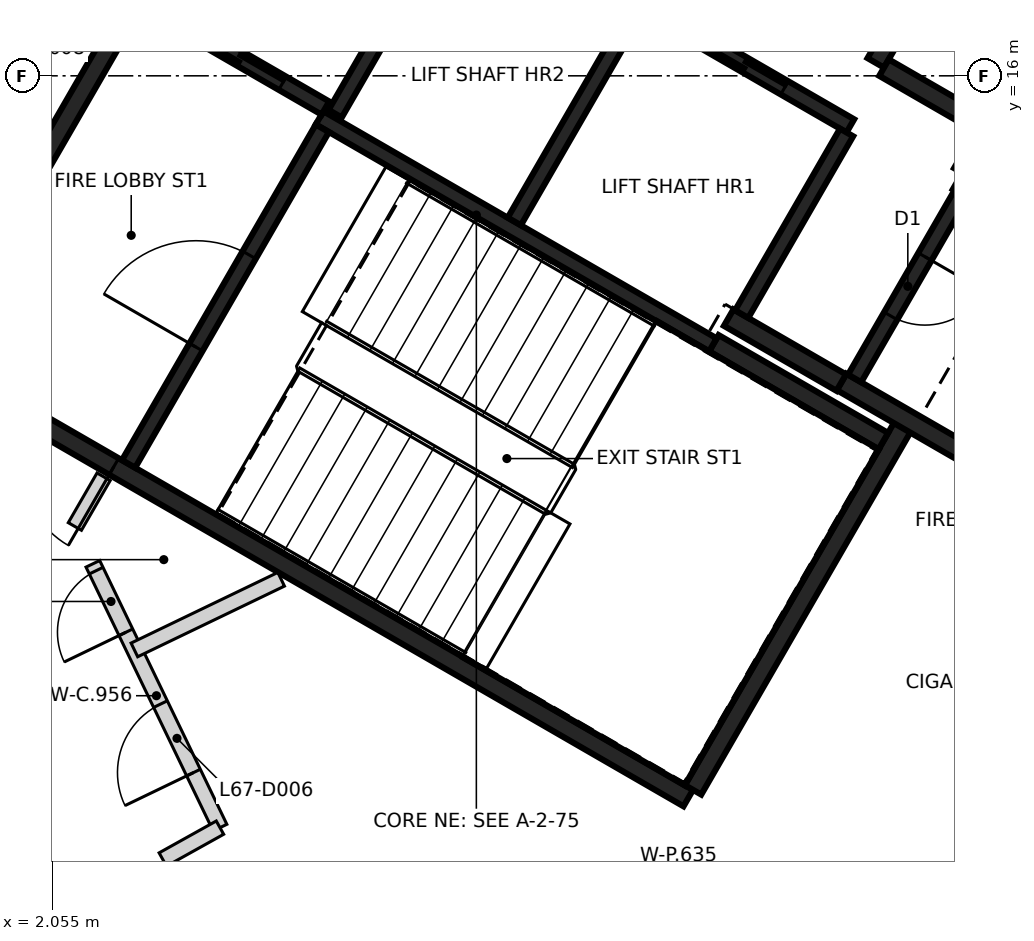
"""IFC4 building model, lengths in metres.
Left out: names, types, materials, properties, quantities, classifications, styles, units other than length and angle.
Written with IfcOpenShell. Run it as: python <this file> out.ifc"""

import sys

from ifc_helpers import new_model, si_unit, direction, frame, frame_2d, origin, place, context, subcontext, project, spatial, rectangle, extrude, element, fill, save


model = new_model("IFC4")
c1 = context("Model", 3, precision=1e-05, world=origin(), true_north=direction((0.0, 1.0)))
c2 = subcontext(c1, "Body", "Model", "MODEL_VIEW")
j1 = project(units=[si_unit("LENGTHUNIT", "METRE"), si_unit("PLANEANGLEUNIT", "RADIAN")], contexts=[c1])
p1 = place(None, origin())
s1 = spatial("IfcSite", under=j1, at=p1, CompositionType="ELEMENT")
p2 = place(p1, origin())
s2 = spatial("IfcBuilding", under=s1, at=p2, CompositionType="ELEMENT")
p3 = place(p2, frame((0.0, 0.0, 265.8)))
s3 = spatial("IfcBuildingStorey", under=s2, at=p3, CompositionType="ELEMENT", Elevation=265.8)
p4 = place(p3, frame((10.42, 6.498, 0.0), z_axis=(0.0, 0.0, 1.0), x_axis=(-0.866021906294, 0.500006057782, 0.0)))
e1 = element("IfcWall", 1, at=p4, inside=s3, PredefinedType="SHEAR", context=c2, shape_type="SweptSolid", body=[
    extrude(rectangle(XDim=11.55, YDim=0.25, at=frame_2d((5.775, 0.0))), origin(), (0.0, 0.0, 1.0), 3.25),
])
p5 = place(p4, frame((10.025, 0.0, 0.0)))
e2 = element("IfcOpeningElement", 2, at=p5, cuts=e1, PredefinedType="OPENING", context=c2, shape_type="SweptSolid", body=[
    extrude(rectangle(XDim=1.2, YDim=2.1, at=frame_2d((0.6, 1.05))), frame((0.0, 0.135, 0.0), z_axis=(0.0, -1.0, 0.0), x_axis=(1.0, 0.0, 0.0)), (0.0, 0.0, 1.0), 0.27),
])
p6 = place(p4, frame((8.725, 0.0, 0.0)))
e3 = element("IfcOpeningElement", 3, at=p6, cuts=e1, PredefinedType="OPENING", context=c2, shape_type="SweptSolid", body=[
    extrude(rectangle(XDim=1.2, YDim=2.1, at=frame_2d((0.6, 1.05))), frame((0.0, 0.135, 0.0), z_axis=(0.0, -1.0, 0.0), x_axis=(1.0, 0.0, 0.0)), (0.0, 0.0, 1.0), 0.27),
])
p7 = place(p3, frame((0.48, 12.381, 0.0), z_axis=(0.0, 0.0, 1.0), x_axis=(0.49999885962, 0.866026062182, 0.0)))
e4 = element("IfcWall", 4, at=p7, inside=s3, PredefinedType="SHEAR", context=c2, shape_type="SweptSolid", body=[
    extrude(rectangle(XDim=5.225, YDim=0.25, at=frame_2d((2.612, 0.0))), origin(), (0.0, 0.0, 1.0), 3.25),
])
p8 = place(p3, frame((13.238, 11.378, 0.0), z_axis=(0.0, 0.0, 1.0), x_axis=(-0.500008851346, -0.866020293397, 0.0)))
e5 = element("IfcWall", 5, at=p8, inside=s3, PredefinedType="SHEAR", context=c2, shape_type="SweptSolid", body=[
    extrude(rectangle(XDim=5.51, YDim=0.25, at=frame_2d((2.755, 0.0))), origin(), (0.0, 0.0, 1.0), 3.25),
])
p9 = place(p3, frame((14.918, 10.54, 0.0), z_axis=(0.0, 0.0, 1.0), x_axis=(-0.866063538972, 0.499933942099, 0.0)))
e6 = element("IfcWall", 6, at=p9, inside=s3, PredefinedType="SHEAR", context=c2, shape_type="SweptSolid", body=[
    extrude(rectangle(XDim=2.865, YDim=0.25, at=frame_2d((1.432, 0.0))), origin(), (0.0, 0.0, 1.0), 3.25),
])
p10 = place(p3, frame((13.963, 14.614, 0.0), z_axis=(0.0, 0.0, 1.0), x_axis=(0.866042235819, -0.499970844928, 0.0)))
e7 = element("IfcWall", 7, at=p10, inside=s3, PredefinedType="SHEAR", context=c2, shape_type="SweptSolid", body=[
    extrude(rectangle(XDim=2.865, YDim=0.25, at=frame_2d((1.432, 0.0))), origin(), (0.0, 0.0, 1.0), 3.25),
])
p11 = place(p3, frame((10.757, 12.481, 0.0), z_axis=(0.0, 0.0, 1.0), x_axis=(0.866022940537, -0.500004266446, 0.0)))
e8 = element("IfcWall", 8, at=p11, inside=s3, PredefinedType="SHEAR", context=c2, shape_type="SweptSolid", body=[
    extrude(rectangle(XDim=2.575, YDim=0.25, at=frame_2d((1.287, 0.0))), origin(), (0.0, 0.0, 1.0), 3.25),
])
p12 = place(p3, frame((13.819, 17.785, 0.0), z_axis=(0.0, 0.0, 1.0), x_axis=(-0.500039802285, -0.866002422705, 0.0)))
e9 = element("IfcWall", 9, at=p12, inside=s3, PredefinedType="SHEAR", context=c2, shape_type="SweptSolid", body=[
    extrude(rectangle(XDim=1.865, YDim=0.25, at=frame_2d((0.932, 0.0))), origin(), (0.0, 0.0, 1.0), 3.25),
])
p13 = place(p3, frame((12.433, 11.964, 0.0), z_axis=(0.0, 0.0, 1.0), x_axis=(-0.866038183914, 0.499977863513, 0.0)))
e10 = element("IfcWall", 10, at=p13, inside=s3, PredefinedType="SHEAR", context=c2, shape_type="SweptSolid", body=[
    extrude(rectangle(XDim=1.71, YDim=0.25, at=frame_2d((0.855, 0.0))), origin(), (0.0, 0.0, 1.0), 3.25),
])
p14 = place(p3, frame((12.995, 16.108, 0.0), z_axis=(0.0, 0.0, 1.0), x_axis=(0.866044474677, -0.49996696679, 0.0)))
e11 = element("IfcWall", 11, at=p14, inside=s3, PredefinedType="SHEAR", context=c2, shape_type="SweptSolid", body=[
    extrude(rectangle(XDim=1.584, YDim=0.25, at=frame_2d((0.792, 0.0))), origin(), (0.0, 0.0, 1.0), 3.25),
])
p15 = place(p3, frame((14.305, 15.207, 0.0), z_axis=(0.0, 0.0, 1.0), x_axis=(-0.499848422343, -0.866112899501, 0.0)))
e12 = element("IfcWall", 12, at=p15, inside=s3, PredefinedType="SHEAR", context=c2, shape_type="SweptSolid", body=[
    extrude(rectangle(XDim=0.559, YDim=0.25, at=frame_2d((0.28, 0.0))), origin(), (0.0, 0.0, 1.0), 3.25),
])
p16 = place(p3, frame((12.552, 15.342, 0.0), z_axis=(0.0, 0.0, 1.0), x_axis=(-0.866030299012, 0.499991521122, 0.0)))
e13 = element("IfcWall", 13, at=p16, inside=s3, PredefinedType="SHEAR", context=c2, shape_type="SweptSolid", body=[
    extrude(rectangle(XDim=6.1, YDim=0.2, at=frame_2d((3.05, 0.0))), origin(), (0.0, 0.0, 1.0), 3.25),
])
p17 = place(p16, frame((1.0, 0.0, 0.0)))
e14 = element("IfcOpeningElement", 14, at=p17, cuts=e13, PredefinedType="OPENING", context=c2, shape_type="SweptSolid", body=[
    extrude(rectangle(XDim=1.2, YDim=2.1, at=frame_2d((0.6, 1.05))), frame((0.0, 0.11, 0.0), z_axis=(0.0, -1.0, 0.0), x_axis=(1.0, 0.0, 0.0)), (0.0, 0.0, 1.0), 0.22),
])
p18 = place(p16, frame((3.982, 0.0, 0.0)))
e15 = element("IfcOpeningElement", 15, at=p18, cuts=e13, PredefinedType="OPENING", context=c2, shape_type="SweptSolid", body=[
    extrude(rectangle(XDim=1.2, YDim=2.1, at=frame_2d((0.6, 1.05))), frame((0.0, 0.11, 0.0), z_axis=(0.0, -1.0, 0.0), x_axis=(1.0, 0.0, 0.0)), (0.0, 0.0, 1.0), 0.22),
])
p19 = place(p3, frame((10.743, 12.46, 0.0), z_axis=(0.0, 0.0, 1.0), x_axis=(-0.866018848283, 0.500011354289, 0.0)))
e16 = element("IfcWall", 16, at=p19, inside=s3, PredefinedType="SHEAR", context=c2, shape_type="SweptSolid", body=[
    extrude(rectangle(XDim=5.974, YDim=0.2, at=frame_2d((2.987, 0.0))), origin(), (0.0, 0.0, 1.0), 3.25),
])
p20 = place(p3, frame((3.057, 10.895, 0.0), z_axis=(0.0, 0.0, 1.0), x_axis=(0.500027839223, 0.866009330205, 0.0)))
e17 = element("IfcWall", 17, at=p20, inside=s3, PredefinedType="SHEAR", context=c2, shape_type="SweptSolid", body=[
    extrude(rectangle(XDim=5.098, YDim=0.2, at=frame_2d((2.549, 0.0))), origin(), (0.0, 0.0, 1.0), 3.25),
])
p21 = place(p20, frame((1.774, 0.0, 0.0)))
e18 = element("IfcOpeningElement", 18, at=p21, cuts=e17, PredefinedType="OPENING", context=c2, shape_type="SweptSolid", body=[
    extrude(rectangle(XDim=1.4, YDim=2.1, at=frame_2d((0.7, 1.05))), frame((0.0, 0.11, 0.0), z_axis=(0.0, -1.0, 0.0), x_axis=(1.0, 0.0, 0.0)), (0.0, 0.0, 1.0), 0.22),
])
p22 = place(p3, frame((8.132, 14.084, 0.0), z_axis=(0.0, 0.0, 1.0), x_axis=(0.500030834389, 0.86600760081, 0.0)))
e19 = element("IfcWall", 19, at=p22, inside=s3, PredefinedType="SHEAR", context=c2, shape_type="SweptSolid", body=[
    extrude(rectangle(XDim=3.198, YDim=0.2, at=frame_2d((1.599, 0.0))), origin(), (0.0, 0.0, 1.0), 3.25),
])
p23 = place(p3, frame((14.008, 14.442, 0.0), z_axis=(0.0, 0.0, 1.0), x_axis=(-0.499986818241, -0.866033014143, 0.0)))
e20 = element("IfcWall", 20, at=p23, inside=s3, PredefinedType="SHEAR", context=c2, shape_type="SweptSolid", body=[
    extrude(rectangle(XDim=2.798, YDim=0.2, at=frame_2d((1.399, 0.0))), origin(), (0.0, 0.0, 1.0), 3.25),
])
p24 = place(p23, frame((0.949, 0.0, 0.0)))
e21 = element("IfcOpeningElement", 21, at=p24, cuts=e20, PredefinedType="OPENING", context=c2, shape_type="SweptSolid", body=[
    extrude(rectangle(XDim=0.9, YDim=2.1, at=frame_2d((0.45, 1.05))), frame((0.0, 0.11, 0.0), z_axis=(0.0, -1.0, 0.0), x_axis=(1.0, 0.0, 0.0)), (0.0, 0.0, 1.0), 0.22),
])
p25 = place(p3, frame((12.502, 15.255, 0.0), z_axis=(0.0, 0.0, 1.0), x_axis=(-0.499965018551, -0.866045599391, 0.0)))
e22 = element("IfcWall", 22, at=p25, inside=s3, PredefinedType="SHEAR", context=c2, shape_type="SweptSolid", body=[
    extrude(rectangle(XDim=2.759, YDim=0.2, at=frame_2d((1.379, 0.0))), origin(), (0.0, 0.0, 1.0), 3.25),
])
p26 = place(p3, frame((7.324, 18.187, 0.0), z_axis=(0.0, 0.0, 1.0), x_axis=(-0.499967891604, -0.866043940782, 0.0)))
e23 = element("IfcWall", 23, at=p26, inside=s3, PredefinedType="SHEAR", context=c2, shape_type="SweptSolid", body=[
    extrude(rectangle(XDim=3.1, YDim=0.2, at=frame_2d((1.55, 0.0))), origin(), (0.0, 0.0, 1.0), 3.25),
])
p27 = place(p3, frame((5.646, 15.576, 0.0), z_axis=(0.0, 0.0, 1.0), x_axis=(-0.866018407898, 0.500012117035, 0.0)))
e24 = element("IfcWall", 24, at=p27, inside=s3, PredefinedType="SHEAR", context=c2, shape_type="SweptSolid", body=[
    extrude(rectangle(XDim=2.651, YDim=0.2, at=frame_2d((1.325, 0.0))), origin(), (0.0, 0.0, 1.0), 3.25),
])
p28 = place(p27, frame((0.652, 0.0, 0.0)))
e25 = element("IfcOpeningElement", 25, at=p28, cuts=e24, PredefinedType="OPENING", context=c2, shape_type="SweptSolid", body=[
    extrude(rectangle(XDim=1.3, YDim=2.1, at=frame_2d((0.65, 1.05))), frame((0.0, 0.11, 0.0), z_axis=(0.0, -1.0, 0.0), x_axis=(1.0, 0.0, 0.0)), (0.0, 0.0, 1.0), 0.22),
])
p29 = place(p3, frame((-1.027, 12.757, 0.0), z_axis=(0.0, 0.0, 1.0), x_axis=(0.492663063759, 0.870220147783, 0.0)))
e26 = element("IfcWall", 26, at=p29, inside=s3, PredefinedType="PARTITIONING", context=c2, shape_type="SweptSolid", body=[
    extrude(rectangle(XDim=6.187, YDim=0.2, at=frame_2d((3.094, 0.0))), origin(), (0.0, 0.0, 1.0), 3.25),
])
p30 = place(p29, frame((2.65, 0.0, 0.0)))
e27 = element("IfcOpeningElement", 27, at=p30, cuts=e26, PredefinedType="OPENING", context=c2, shape_type="SweptSolid", body=[
    extrude(rectangle(XDim=0.95, YDim=2.1, at=frame_2d((0.475, 1.05))), frame((0.0, 0.11, 0.0), z_axis=(0.0, -1.0, 0.0), x_axis=(1.0, 0.0, 0.0)), (0.0, 0.0, 1.0), 0.22),
])
p31 = place(p3, frame((2.35, 10.071, 0.0), z_axis=(0.0, 0.0, 1.0), x_axis=(0.500309905322, 0.865846405916, 0.0)))
e28 = element("IfcWall", 28, at=p31, inside=s3, PredefinedType="PARTITIONING", context=c2, shape_type="SweptSolid", body=[
    extrude(rectangle(XDim=0.755, YDim=0.2, at=frame_2d((0.378, 0.0))), origin(), (0.0, 0.0, 1.0), 3.25),
])
p32 = place(p3, frame((4.26, 6.109, 0.0), z_axis=(0.0, 0.0, 1.0), x_axis=(-0.434189007872, 0.900821794498, 0.0)))
e29 = element("IfcWall", 29, at=p32, inside=s3, PredefinedType="PARTITIONING", context=c2, shape_type="SweptSolid", body=[
    extrude(rectangle(XDim=3.853, YDim=0.2, at=frame_2d((1.926, 0.0))), origin(), (0.0, 0.0, 1.0), 3.25),
])
p33 = place(p32, frame((2.853, 0.0, 0.0)))
e30 = element("IfcOpeningElement", 30, at=p33, cuts=e29, PredefinedType="OPENING", context=c2, shape_type="SweptSolid", body=[
    extrude(rectangle(XDim=0.9, YDim=2.1, at=frame_2d((0.45, 1.05))), frame((0.0, 0.11, 0.0), z_axis=(0.0, -1.0, 0.0), x_axis=(1.0, 0.0, 0.0)), (0.0, 0.0, 1.0), 0.22),
])
p34 = place(p32, frame((0.804, 0.0, 0.0)))
e31 = element("IfcOpeningElement", 31, at=p34, cuts=e29, PredefinedType="OPENING", context=c2, shape_type="SweptSolid", body=[
    extrude(rectangle(XDim=1.0, YDim=2.1, at=frame_2d((0.5, 1.05))), frame((0.0, 0.11, 0.0), z_axis=(0.0, -1.0, 0.0), x_axis=(1.0, 0.0, 0.0)), (0.0, 0.0, 1.0), 0.22),
])
p35 = place(p3, frame((3.507, 5.69, 0.0), z_axis=(0.0, 0.0, 1.0), x_axis=(0.873567976284, 0.486702158215, 0.0)))
e32 = element("IfcWall", 32, at=p35, inside=s3, PredefinedType="PARTITIONING", context=c2, shape_type="SweptSolid", body=[
    extrude(rectangle(XDim=0.861, YDim=0.2, at=frame_2d((0.43, 0.0))), origin(), (0.0, 0.0, 1.0), 3.25),
])
p36 = place(p3, frame((3.133, 8.447, 0.0), z_axis=(0.0, 0.0, 1.0), x_axis=(0.900981876458, 0.433856725538, 0.0)))
e33 = element("IfcWall", 33, at=p36, inside=s3, PredefinedType="PARTITIONING", context=c2, shape_type="SweptSolid", body=[
    extrude(rectangle(XDim=2.143, YDim=0.2, at=frame_2d((1.071, 0.0))), origin(), (0.0, 0.0, 1.0), 3.25),
])
p37 = place(p28, origin())
e34 = element("IfcDoor", 34, at=p37, inside=s3, OperationType="SLIDING_TO_RIGHT", PredefinedType="DOOR", context=c2, shape_type="SweptSolid", body=[
    extrude(rectangle(XDim=1.3, YDim=2.1, at=frame_2d((0.65, 1.05))), frame((0.0, 0.025, 0.0), z_axis=(0.0, -1.0, 0.0), x_axis=(1.0, 0.0, 0.0)), (0.0, 0.0, 1.0), 0.05),
])
fill(e25, e34)
p38 = place(p17, origin())
e35 = element("IfcDoor", 35, at=p38, inside=s3, OperationType="DOUBLE_DOOR_SLIDING", PredefinedType="DOOR", context=c2, shape_type="SweptSolid", body=[
    extrude(rectangle(XDim=1.2, YDim=2.1, at=frame_2d((0.6, 1.05))), frame((0.0, 0.025, 0.0), z_axis=(0.0, -1.0, 0.0), x_axis=(1.0, 0.0, 0.0)), (0.0, 0.0, 1.0), 0.05),
])
fill(e14, e35)
p39 = place(p6, origin())
e36 = element("IfcDoor", 36, at=p39, inside=s3, OperationType="SINGLE_SWING_RIGHT", PredefinedType="DOOR", context=c2, shape_type="SweptSolid", body=[
    extrude(rectangle(XDim=1.2, YDim=2.1, at=frame_2d((0.6, 1.05))), frame((0.0, 0.025, 0.0), z_axis=(0.0, -1.0, 0.0), x_axis=(1.0, 0.0, 0.0)), (0.0, 0.0, 1.0), 0.05),
])
fill(e3, e36)
p40 = place(p21, origin())
e37 = element("IfcDoor", 37, at=p40, inside=s3, OperationType="SINGLE_SWING_RIGHT", PredefinedType="DOOR", context=c2, shape_type="SweptSolid", body=[
    extrude(rectangle(XDim=1.4, YDim=2.1, at=frame_2d((0.7, 1.05))), frame((0.0, 0.025, 0.0), z_axis=(0.0, -1.0, 0.0), x_axis=(1.0, 0.0, 0.0)), (0.0, 0.0, 1.0), 0.05),
])
fill(e18, e37)
p41 = place(p24, origin())
e38 = element("IfcDoor", 38, at=p41, inside=s3, OperationType="SINGLE_SWING_LEFT", PredefinedType="DOOR", context=c2, shape_type="SweptSolid", body=[
    extrude(rectangle(XDim=0.9, YDim=2.1, at=frame_2d((0.45, 1.05))), frame((0.0, 0.025, 0.0), z_axis=(0.0, -1.0, 0.0), x_axis=(1.0, 0.0, 0.0)), (0.0, 0.0, 1.0), 0.05),
])
fill(e21, e38)
p42 = place(p33, origin())
e39 = element("IfcDoor", 39, at=p42, inside=s3, OperationType="SINGLE_SWING_LEFT", PredefinedType="DOOR", context=c2, shape_type="SweptSolid", body=[
    extrude(rectangle(XDim=0.9, YDim=2.1, at=frame_2d((0.45, 1.05))), frame((0.0, 0.025, 0.0), z_axis=(0.0, -1.0, 0.0), x_axis=(1.0, 0.0, 0.0)), (0.0, 0.0, 1.0), 0.05),
])
fill(e30, e39)
p43 = place(p34, origin())
e40 = element("IfcDoor", 40, at=p43, inside=s3, OperationType="SINGLE_SWING_LEFT", PredefinedType="DOOR", context=c2, shape_type="SweptSolid", body=[
    extrude(rectangle(XDim=1.0, YDim=2.1, at=frame_2d((0.5, 1.05))), frame((0.0, 0.025, 0.0), z_axis=(0.0, -1.0, 0.0), x_axis=(1.0, 0.0, 0.0)), (0.0, 0.0, 1.0), 0.05),
])
fill(e31, e40)
save(model, sys.argv[1])
